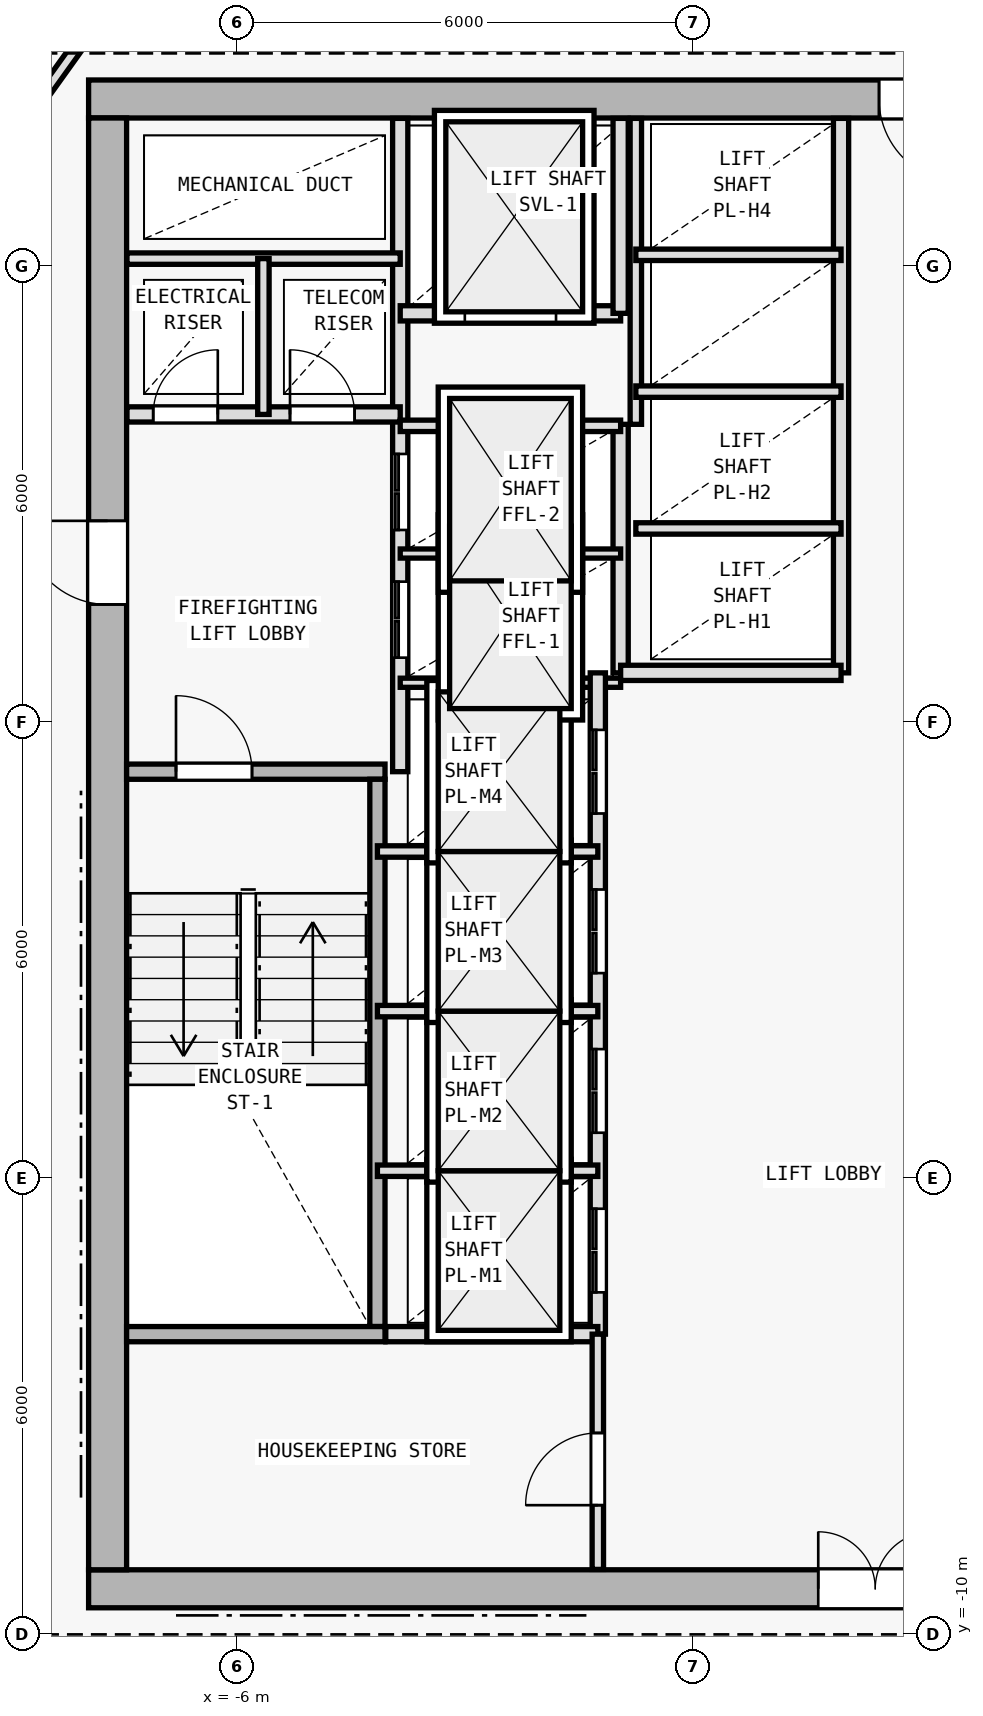
"""IFC4 building model, lengths in metres.
Left out: names, types, materials, properties, quantities, classifications, styles, units other than length and angle.
Written with IfcOpenShell. Run it as: python <this file> out.ifc"""

import sys

from ifc_helpers import new_model, si_unit, direction, frame, frame_2d, origin, origin_2d, place, context, subcontext, project, spatial, rectangle, i_section, extrude, element, fill, save


model = new_model("IFC4")
c1 = context("Model", 3, precision=1e-05, world=origin(), true_north=direction((0.0, 1.0)))
c2 = subcontext(c1, "Body", "Model", "MODEL_VIEW")
j1 = project(units=[si_unit("LENGTHUNIT", "METRE"), si_unit("PLANEANGLEUNIT", "RADIAN")], contexts=[c1])
p1 = place(None, origin())
s1 = spatial("IfcSite", under=j1, at=p1, CompositionType="ELEMENT")
p2 = place(p1, origin())
s2 = spatial("IfcBuilding", under=s1, at=p2, CompositionType="ELEMENT")
p3 = place(p2, frame((0.0, 0.0, 145.8)))
s3 = spatial("IfcBuildingStorey", under=s2, at=p3, CompositionType="ELEMENT", Elevation=145.8)
for number, where, z_axis, x_axis in (
    (1, (-7.7, -9.4, 0.0), (0.0, 0.0, 1.0), (1.0, 0.0, 0.0)),
    (2, (-7.7, 10.2, 0.0), (0.0, 0.0, 1.0), (1.0, 0.0, 0.0)),
    (3, (0.0, -9.4, 0.0), (0.0, 0.0, 1.0), (1.0, 0.0, 0.0)),
    (4, (-7.7, 2.0, 0.0), (0.0, 0.0, 1.0), (1.0, 0.0, 0.0)),
):
    element("IfcColumn", number, at=place(p3, frame(where, z_axis=z_axis, x_axis=x_axis)), inside=s3, PredefinedType="COLUMN", context=c2, shape_type="SweptSolid", body=[
        extrude(i_section(OverallWidth=0.404, OverallDepth=0.407, WebThickness=0.017, FlangeThickness=0.028, FilletRadius=0.015, at=origin_2d()), origin(), (0.0, 0.0, 1.0), 3.6),
    ])
p4 = place(p3, frame((-7.95, -9.4, 0.0), z_axis=(0.0, 0.0, 1.0), x_axis=(1.0, 0.0, 0.0)))
e5 = element("IfcWall", 5, at=p4, inside=s3, PredefinedType="SHEAR", context=c2, shape_type="SweptSolid", body=[
    extrude(rectangle(XDim=15.9, YDim=0.5, at=frame_2d((7.95, 0.0))), origin(), (0.0, 0.0, 1.0), 3.35),
])
p5 = place(p4, frame((9.6, 0.0, 0.0)))
e6 = element("IfcOpeningElement", 6, at=p5, cuts=e5, PredefinedType="OPENING", context=c2, shape_type="SweptSolid", body=[
    extrude(rectangle(XDim=1.5, YDim=2.2, at=frame_2d((0.75, 1.1))), frame((0.0, 0.26, 0.0), z_axis=(0.0, -1.0, 0.0), x_axis=(1.0, 0.0, 0.0)), (0.0, 0.0, 1.0), 0.52),
])
p6 = place(p3, frame((7.95, 10.2, 0.0), z_axis=(0.0, 0.0, 1.0), x_axis=(-1.0, 0.0, 0.0)))
e7 = element("IfcWall", 7, at=p6, inside=s3, PredefinedType="SHEAR", context=c2, shape_type="SweptSolid", body=[
    extrude(rectangle(XDim=15.9, YDim=0.5, at=frame_2d((7.95, 0.0))), origin(), (0.0, 0.0, 1.0), 3.35),
])
p7 = place(p6, frame((4.4, 0.0, 0.0)))
e8 = element("IfcOpeningElement", 8, at=p7, cuts=e7, PredefinedType="OPENING", context=c2, shape_type="SweptSolid", body=[
    extrude(rectangle(XDim=1.1, YDim=2.15, at=frame_2d((0.55, 1.075))), frame((0.0, 0.26, 0.0), z_axis=(0.0, -1.0, 0.0), x_axis=(1.0, 0.0, 0.0)), (0.0, 0.0, 1.0), 0.52),
])
p8 = place(p3, frame((-7.7, -9.15, 0.0), z_axis=(0.0, 0.0, 1.0), x_axis=(0.0, 1.0, 0.0)))
e9 = element("IfcWall", 9, at=p8, inside=s3, PredefinedType="SHEAR", context=c2, shape_type="SweptSolid", body=[
    extrude(rectangle(XDim=19.1, YDim=0.5, at=frame_2d((9.55, 0.0))), origin(), (0.0, 0.0, 1.0), 3.35),
])
p9 = place(p8, frame((12.7, 0.0, 0.0)))
e10 = element("IfcOpeningElement", 10, at=p9, cuts=e9, PredefinedType="OPENING", context=c2, shape_type="SweptSolid", body=[
    extrude(rectangle(XDim=1.1, YDim=2.15, at=frame_2d((0.55, 1.075))), frame((0.0, 0.26, 0.0), z_axis=(0.0, -1.0, 0.0), x_axis=(1.0, 0.0, 0.0)), (0.0, 0.0, 1.0), 0.52),
])
p10 = place(p3, frame((-7.45, 1.35, 0.0), z_axis=(0.0, 0.0, 1.0), x_axis=(1.0, 0.0, 0.0)))
e11 = element("IfcWall", 11, at=p10, inside=s3, PredefinedType="SOLIDWALL", context=c2, shape_type="SweptSolid", body=[
    extrude(rectangle(XDim=3.4, YDim=0.2, at=frame_2d((1.7, 0.0))), origin(), (0.0, 0.0, 1.0), 3.35),
])
p11 = place(p10, frame((0.65, 0.0, 0.0)))
e12 = element("IfcOpeningElement", 12, at=p11, cuts=e11, PredefinedType="OPENING", context=c2, shape_type="SweptSolid", body=[
    extrude(rectangle(XDim=1.0, YDim=2.15, at=frame_2d((0.5, 1.075))), frame((0.0, 0.11, 0.0), z_axis=(0.0, -1.0, 0.0), x_axis=(1.0, 0.0, 0.0)), (0.0, 0.0, 1.0), 0.22),
])
p12 = place(p3, frame((-4.15, -5.95, 0.0), z_axis=(0.0, 0.0, 1.0), x_axis=(0.0, 1.0, 0.0)))
e13 = element("IfcWall", 13, at=p12, inside=s3, PredefinedType="SOLIDWALL", context=c2, shape_type="SweptSolid", body=[
    extrude(rectangle(XDim=7.2, YDim=0.2, at=frame_2d((3.6, 0.0))), origin(), (0.0, 0.0, 1.0), 3.35),
])
p13 = place(p3, frame((-3.85, 1.35, 0.0), z_axis=(0.0, 0.0, 1.0), x_axis=(0.0, 1.0, 0.0)))
e14 = element("IfcWall", 14, at=p13, inside=s3, PredefinedType="SOLIDWALL", context=c2, shape_type="SweptSolid", body=[
    extrude(rectangle(XDim=8.595, YDim=0.2, at=frame_2d((4.297, 0.0))), origin(), (0.0, 0.0, 1.0), 3.35),
])
p14 = place(p13, frame((1.5, 0.0, 0.0)))
e15 = element("IfcOpeningElement", 15, at=p14, cuts=e14, PredefinedType="OPENING", context=c2, shape_type="SweptSolid", body=[
    extrude(rectangle(XDim=1.0, YDim=2.15, at=frame_2d((0.5, 1.075))), frame((0.0, 0.11, 0.0), z_axis=(0.0, -1.0, 0.0), x_axis=(1.0, 0.0, 0.0)), (0.0, 0.0, 1.0), 0.22),
])
p15 = place(p13, frame((3.18, 0.0, 0.0)))
e16 = element("IfcOpeningElement", 16, at=p15, cuts=e14, PredefinedType="OPENING", context=c2, shape_type="SweptSolid", body=[
    extrude(rectangle(XDim=1.0, YDim=2.15, at=frame_2d((0.5, 1.075))), frame((0.0, 0.11, 0.0), z_axis=(0.0, -1.0, 0.0), x_axis=(1.0, 0.0, 0.0)), (0.0, 0.0, 1.0), 0.22),
])
p16 = place(p3, frame((-7.445, 6.05, 0.0), z_axis=(0.0, 0.0, 1.0), x_axis=(1.0, 0.0, 0.0)))
e17 = element("IfcWall", 17, at=p16, inside=s3, PredefinedType="SOLIDWALL", context=c2, shape_type="SweptSolid", body=[
    extrude(rectangle(XDim=3.595, YDim=0.2, at=frame_2d((1.797, 0.0))), origin(), (0.0, 0.0, 1.0), 3.35),
])
p17 = place(p16, frame((0.345, 0.0, 0.0)))
e18 = element("IfcOpeningElement", 18, at=p17, cuts=e17, PredefinedType="OPENING", context=c2, shape_type="SweptSolid", body=[
    extrude(rectangle(XDim=0.85, YDim=2.1, at=frame_2d((0.425, 1.05))), frame((0.0, 0.11, 0.0), z_axis=(0.0, -1.0, 0.0), x_axis=(1.0, 0.0, 0.0)), (0.0, 0.0, 1.0), 0.22),
])
p18 = place(p16, frame((2.145, 0.0, 0.0)))
e19 = element("IfcOpeningElement", 19, at=p18, cuts=e17, PredefinedType="OPENING", context=c2, shape_type="SweptSolid", body=[
    extrude(rectangle(XDim=0.85, YDim=2.1, at=frame_2d((0.425, 1.05))), frame((0.0, 0.11, 0.0), z_axis=(0.0, -1.0, 0.0), x_axis=(1.0, 0.0, 0.0)), (0.0, 0.0, 1.0), 0.22),
])
p19 = place(p3, frame((-7.445, 8.1, 0.0), z_axis=(0.0, 0.0, 1.0), x_axis=(1.0, 0.0, 0.0)))
e20 = element("IfcWall", 20, at=p19, inside=s3, PredefinedType="PARTITIONING", context=c2, shape_type="SweptSolid", body=[
    extrude(rectangle(XDim=3.595, YDim=0.15, at=frame_2d((1.797, 0.0))), origin(), (0.0, 0.0, 1.0), 3.35),
])
p20 = place(p3, frame((-5.65, 6.05, 0.0), z_axis=(0.0, 0.0, 1.0), x_axis=(0.0, 1.0, 0.0)))
e21 = element("IfcWall", 21, at=p20, inside=s3, PredefinedType="PARTITIONING", context=c2, shape_type="SweptSolid", body=[
    extrude(rectangle(XDim=2.05, YDim=0.15, at=frame_2d((1.025, 0.0))), origin(), (0.0, 0.0, 1.0), 3.35),
])
p21 = place(p3, frame((-0.95, 2.65, 0.0), z_axis=(0.0, 0.0, 1.0), x_axis=(0.0, 1.0, 0.0)))
e22 = element("IfcWall", 22, at=p21, inside=s3, PredefinedType="SOLIDWALL", context=c2, shape_type="SweptSolid", body=[
    extrude(rectangle(XDim=3.27, YDim=0.2, at=frame_2d((1.635, 0.0))), origin(), (0.0, 0.0, 1.0), 3.35),
])
for number, where, z_axis, x_axis in (
    (23, (-3.85, 2.52, 0.0), (0.0, 0.0, 1.0), (1.0, 0.0, 0.0)),
    (24, (-3.85, 4.22, 0.0), (0.0, 0.0, 1.0), (1.0, 0.0, 0.0)),
):
    element("IfcWall", number, at=place(p3, frame(where, z_axis=z_axis, x_axis=x_axis)), inside=s3, PredefinedType="PARTITIONING", context=c2, shape_type="SweptSolid", body=[
        extrude(rectangle(XDim=2.9, YDim=0.12, at=frame_2d((1.45, 0.0))), origin(), (0.0, 0.0, 1.0), 3.35),
    ])
p22 = place(p3, frame((-3.85, 5.9, 0.0), z_axis=(0.0, 0.0, 1.0), x_axis=(1.0, 0.0, 0.0)))
e25 = element("IfcWall", 25, at=p22, inside=s3, PredefinedType="PARTITIONING", context=c2, shape_type="SweptSolid", body=[
    extrude(rectangle(XDim=2.9, YDim=0.15, at=frame_2d((1.45, 0.0))), origin(), (0.0, 0.0, 1.0), 3.35),
])
p23 = place(p3, frame((-3.85, 7.38, 0.0), z_axis=(0.0, 0.0, 1.0), x_axis=(1.0, 0.0, 0.0)))
e26 = element("IfcWall", 26, at=p23, inside=s3, PredefinedType="SOLIDWALL", context=c2, shape_type="SweptSolid", body=[
    extrude(rectangle(XDim=2.9, YDim=0.2, at=frame_2d((1.45, 0.0))), origin(), (0.0, 0.0, 1.0), 3.35),
])
p24 = place(p23, frame((0.85, 0.0, 0.0)))
e27 = element("IfcOpeningElement", 27, at=p24, cuts=e26, PredefinedType="OPENING", context=c2, shape_type="SweptSolid", body=[
    extrude(rectangle(XDim=1.2, YDim=2.2, at=frame_2d((0.6, 1.1))), frame((0.0, 0.11, 0.0), z_axis=(0.0, -1.0, 0.0), x_axis=(1.0, 0.0, 0.0)), (0.0, 0.0, 1.0), 0.22),
])
p25 = place(p3, frame((-0.95, 7.38, 0.0), z_axis=(0.0, 0.0, 1.0), x_axis=(0.0, 1.0, 0.0)))
e28 = element("IfcWall", 28, at=p25, inside=s3, PredefinedType="SOLIDWALL", context=c2, shape_type="SweptSolid", body=[
    extrude(rectangle(XDim=2.565, YDim=0.2, at=frame_2d((1.283, 0.0))), origin(), (0.0, 0.0, 1.0), 3.35),
])
p26 = place(p3, frame((-1.25, -6.05, 0.0), z_axis=(0.0, 0.0, 1.0), x_axis=(0.0, 1.0, 0.0)))
e29 = element("IfcWall", 29, at=p26, inside=s3, PredefinedType="SOLIDWALL", context=c2, shape_type="SweptSolid", body=[
    extrude(rectangle(XDim=8.7, YDim=0.2, at=frame_2d((4.35, 0.0))), origin(), (0.0, 0.0, 1.0), 3.35),
])
p27 = place(p26, frame((0.55, 0.0, 0.0)))
e30 = element("IfcOpeningElement", 30, at=p27, cuts=e29, PredefinedType="OPENING", context=c2, shape_type="SweptSolid", body=[
    extrude(rectangle(XDim=1.1, YDim=2.15, at=frame_2d((0.55, 1.075))), frame((0.0, 0.11, 0.0), z_axis=(0.0, -1.0, 0.0), x_axis=(1.0, 0.0, 0.0)), (0.0, 0.0, 1.0), 0.22),
])
p28 = place(p26, frame((2.65, 0.0, 0.0)))
e31 = element("IfcOpeningElement", 31, at=p28, cuts=e29, PredefinedType="OPENING", context=c2, shape_type="SweptSolid", body=[
    extrude(rectangle(XDim=1.1, YDim=2.15, at=frame_2d((0.55, 1.075))), frame((0.0, 0.11, 0.0), z_axis=(0.0, -1.0, 0.0), x_axis=(1.0, 0.0, 0.0)), (0.0, 0.0, 1.0), 0.22),
])
p29 = place(p26, frame((4.75, 0.0, 0.0)))
e32 = element("IfcOpeningElement", 32, at=p29, cuts=e29, PredefinedType="OPENING", context=c2, shape_type="SweptSolid", body=[
    extrude(rectangle(XDim=1.1, YDim=2.15, at=frame_2d((0.55, 1.075))), frame((0.0, 0.11, 0.0), z_axis=(0.0, -1.0, 0.0), x_axis=(1.0, 0.0, 0.0)), (0.0, 0.0, 1.0), 0.22),
])
p30 = place(p26, frame((6.85, 0.0, 0.0)))
e33 = element("IfcOpeningElement", 33, at=p30, cuts=e29, PredefinedType="OPENING", context=c2, shape_type="SweptSolid", body=[
    extrude(rectangle(XDim=1.1, YDim=2.15, at=frame_2d((0.55, 1.075))), frame((0.0, 0.11, 0.0), z_axis=(0.0, -1.0, 0.0), x_axis=(1.0, 0.0, 0.0)), (0.0, 0.0, 1.0), 0.22),
])
for number, where, z_axis, x_axis in (
    (34, (-4.15, -3.9, 0.0), (0.0, 0.0, 1.0), (1.0, 0.0, 0.0)),
    (35, (-4.15, -1.8, 0.0), (0.0, 0.0, 1.0), (1.0, 0.0, 0.0)),
    (36, (-4.15, 0.3, 0.0), (0.0, 0.0, 1.0), (1.0, 0.0, 0.0)),
):
    element("IfcWall", number, at=place(p3, frame(where, z_axis=z_axis, x_axis=x_axis)), inside=s3, PredefinedType="PARTITIONING", context=c2, shape_type="SweptSolid", body=[
        extrude(rectangle(XDim=2.9, YDim=0.15, at=frame_2d((1.45, 0.0))), origin(), (0.0, 0.0, 1.0), 3.35),
    ])
p31 = place(p3, frame((1.95, 2.65, 0.0), z_axis=(0.0, 0.0, 1.0), x_axis=(0.0, 1.0, 0.0)))
e37 = element("IfcWall", 37, at=p31, inside=s3, PredefinedType="SOLIDWALL", context=c2, shape_type="SweptSolid", body=[
    extrude(rectangle(XDim=7.295, YDim=0.2, at=frame_2d((3.647, 0.0))), origin(), (0.0, 0.0, 1.0), 3.35),
])
p32 = place(p3, frame((-0.95, 2.65, 0.0), z_axis=(0.0, 0.0, 1.0), x_axis=(1.0, 0.0, 0.0)))
e38 = element("IfcWall", 38, at=p32, inside=s3, PredefinedType="SOLIDWALL", context=c2, shape_type="SweptSolid", body=[
    extrude(rectangle(XDim=2.9, YDim=0.2, at=frame_2d((1.45, 0.0))), origin(), (0.0, 0.0, 1.0), 3.35),
])
p33 = place(p3, frame((-0.75, 5.92, 0.0), z_axis=(0.0, 0.0, 1.0), x_axis=(0.0, 1.0, 0.0)))
e39 = element("IfcWall", 39, at=p33, inside=s3, PredefinedType="PARTITIONING", context=c2, shape_type="SweptSolid", body=[
    extrude(rectangle(XDim=4.025, YDim=0.15, at=frame_2d((2.013, 0.0))), origin(), (0.0, 0.0, 1.0), 3.35),
])
for number, where, z_axis, x_axis in (
    (40, (-0.75, 4.55, 0.0), (0.0, 0.0, 1.0), (1.0, 0.0, 0.0)),
    (41, (-0.75, 6.35, 0.0), (0.0, 0.0, 1.0), (1.0, 0.0, 0.0)),
    (42, (-0.75, 8.15, 0.0), (0.0, 0.0, 1.0), (1.0, 0.0, 0.0)),
):
    element("IfcWall", number, at=place(p3, frame(where, z_axis=z_axis, x_axis=x_axis)), inside=s3, PredefinedType="PARTITIONING", context=c2, shape_type="SweptSolid", body=[
        extrude(rectangle(XDim=2.7, YDim=0.15, at=frame_2d((1.35, 0.0))), origin(), (0.0, 0.0, 1.0), 3.35),
    ])
p34 = place(p3, frame((-7.45, -6.05, 0.0), z_axis=(0.0, 0.0, 1.0), x_axis=(1.0, 0.0, 0.0)))
e43 = element("IfcWall", 43, at=p34, inside=s3, PredefinedType="SOLIDWALL", context=c2, shape_type="SweptSolid", body=[
    extrude(rectangle(XDim=3.4, YDim=0.2, at=frame_2d((1.7, 0.0))), origin(), (0.0, 0.0, 1.0), 3.35),
])
p35 = place(p3, frame((-4.04, -6.05, 0.0), z_axis=(0.0, 0.0, 1.0), x_axis=(1.0, 0.0, 0.0)))
e44 = element("IfcWall", 44, at=p35, inside=s3, PredefinedType="SOLIDWALL", context=c2, shape_type="SweptSolid", body=[
    extrude(rectangle(XDim=2.79, YDim=0.2, at=frame_2d((1.395, 0.0))), origin(), (0.0, 0.0, 1.0), 3.35),
])
p36 = place(p3, frame((-1.25, -9.145, 0.0), z_axis=(0.0, 0.0, 1.0), x_axis=(0.0, 1.0, 0.0)))
e45 = element("IfcWall", 45, at=p36, inside=s3, PredefinedType="PARTITIONING", context=c2, shape_type="SweptSolid", body=[
    extrude(rectangle(XDim=3.095, YDim=0.15, at=frame_2d((1.547, 0.0))), origin(), (0.0, 0.0, 1.0), 3.35),
])
p37 = place(p36, frame((0.845, 0.0, 0.0)))
e46 = element("IfcOpeningElement", 46, at=p37, cuts=e45, PredefinedType="OPENING", context=c2, shape_type="SweptSolid", body=[
    extrude(rectangle(XDim=0.95, YDim=2.1, at=frame_2d((0.475, 1.05))), frame((0.0, 0.085, 0.0), z_axis=(0.0, -1.0, 0.0), x_axis=(1.0, 0.0, 0.0)), (0.0, 0.0, 1.0), 0.17),
])
p38 = place(p3, frame((-9.86, 8.426, 0.0), z_axis=(0.0, 0.0, 1.0), x_axis=(0.582449511476, 0.812866881218, 0.0)))
e47 = element("IfcWall", 47, at=p38, inside=s3, PredefinedType="PARTITIONING", context=c2, shape_type="SweptSolid", body=[
    extrude(rectangle(XDim=4.84, YDim=0.15, at=frame_2d((2.42, 0.0))), origin(), (0.0, 0.0, 1.0), 2.965),
])
p39 = place(p5, origin())
e48 = element("IfcDoor", 48, at=p39, inside=s3, OperationType="DOUBLE_DOOR_SINGLE_SWING", PredefinedType="DOOR", context=c2, shape_type="SweptSolid", body=[
    extrude(rectangle(XDim=1.5, YDim=2.2, at=frame_2d((0.75, 1.1))), frame((0.0, 0.025, 0.0), z_axis=(0.0, -1.0, 0.0), x_axis=(1.0, 0.0, 0.0)), (0.0, 0.0, 1.0), 0.05),
])
fill(e6, e48)
p40 = place(p9, origin())
e49 = element("IfcDoor", 49, at=p40, inside=s3, OperationType="SINGLE_SWING_RIGHT", PredefinedType="DOOR", context=c2, shape_type="SweptSolid", body=[
    extrude(rectangle(XDim=1.1, YDim=2.15, at=frame_2d((0.55, 1.075))), frame((0.0, 0.025, 0.0), z_axis=(0.0, -1.0, 0.0), x_axis=(1.0, 0.0, 0.0)), (0.0, 0.0, 1.0), 0.05),
])
fill(e10, e49)
p41 = place(p7, origin())
e50 = element("IfcDoor", 50, at=p41, inside=s3, OperationType="SINGLE_SWING_LEFT", PredefinedType="DOOR", context=c2, shape_type="SweptSolid", body=[
    extrude(rectangle(XDim=1.1, YDim=2.15, at=frame_2d((0.55, 1.075))), frame((0.0, 0.025, 0.0), z_axis=(0.0, -1.0, 0.0), x_axis=(1.0, 0.0, 0.0)), (0.0, 0.0, 1.0), 0.05),
])
fill(e8, e50)
p42 = place(p11, origin())
e51 = element("IfcDoor", 51, at=p42, inside=s3, OperationType="SINGLE_SWING_LEFT", PredefinedType="DOOR", context=c2, shape_type="SweptSolid", body=[
    extrude(rectangle(XDim=1.0, YDim=2.15, at=frame_2d((0.5, 1.075))), frame((0.0, 0.025, 0.0), z_axis=(0.0, -1.0, 0.0), x_axis=(1.0, 0.0, 0.0)), (0.0, 0.0, 1.0), 0.05),
])
fill(e12, e51)
p43 = place(p17, origin())
e52 = element("IfcDoor", 52, at=p43, inside=s3, OperationType="SINGLE_SWING_RIGHT", PredefinedType="DOOR", context=c2, shape_type="SweptSolid", body=[
    extrude(rectangle(XDim=0.85, YDim=2.1, at=frame_2d((0.425, 1.05))), frame((0.0, 0.025, 0.0), z_axis=(0.0, -1.0, 0.0), x_axis=(1.0, 0.0, 0.0)), (0.0, 0.0, 1.0), 0.05),
])
fill(e18, e52)
p44 = place(p18, origin())
e53 = element("IfcDoor", 53, at=p44, inside=s3, OperationType="SINGLE_SWING_LEFT", PredefinedType="DOOR", context=c2, shape_type="SweptSolid", body=[
    extrude(rectangle(XDim=0.85, YDim=2.1, at=frame_2d((0.425, 1.05))), frame((0.0, 0.025, 0.0), z_axis=(0.0, -1.0, 0.0), x_axis=(1.0, 0.0, 0.0)), (0.0, 0.0, 1.0), 0.05),
])
fill(e19, e53)
p45 = place(p24, origin())
e54 = element("IfcDoor", 54, at=p45, inside=s3, OperationType="DOUBLE_DOOR_SLIDING", PredefinedType="DOOR", context=c2, shape_type="SweptSolid", body=[
    extrude(rectangle(XDim=1.2, YDim=2.2, at=frame_2d((0.6, 1.1))), frame((0.0, 0.025, 0.0), z_axis=(0.0, -1.0, 0.0), x_axis=(1.0, 0.0, 0.0)), (0.0, 0.0, 1.0), 0.05),
])
fill(e27, e54)
p46 = place(p27, origin())
e55 = element("IfcDoor", 55, at=p46, inside=s3, OperationType="DOUBLE_DOOR_SLIDING", PredefinedType="DOOR", context=c2, shape_type="SweptSolid", body=[
    extrude(rectangle(XDim=1.1, YDim=2.15, at=frame_2d((0.55, 1.075))), frame((0.0, 0.025, 0.0), z_axis=(0.0, -1.0, 0.0), x_axis=(1.0, 0.0, 0.0)), (0.0, 0.0, 1.0), 0.05),
])
fill(e30, e55)
p47 = place(p28, origin())
e56 = element("IfcDoor", 56, at=p47, inside=s3, OperationType="DOUBLE_DOOR_SLIDING", PredefinedType="DOOR", context=c2, shape_type="SweptSolid", body=[
    extrude(rectangle(XDim=1.1, YDim=2.15, at=frame_2d((0.55, 1.075))), frame((0.0, 0.025, 0.0), z_axis=(0.0, -1.0, 0.0), x_axis=(1.0, 0.0, 0.0)), (0.0, 0.0, 1.0), 0.05),
])
fill(e31, e56)
p48 = place(p29, origin())
e57 = element("IfcDoor", 57, at=p48, inside=s3, OperationType="DOUBLE_DOOR_SLIDING", PredefinedType="DOOR", context=c2, shape_type="SweptSolid", body=[
    extrude(rectangle(XDim=1.1, YDim=2.15, at=frame_2d((0.55, 1.075))), frame((0.0, 0.025, 0.0), z_axis=(0.0, -1.0, 0.0), x_axis=(1.0, 0.0, 0.0)), (0.0, 0.0, 1.0), 0.05),
])
fill(e32, e57)
p49 = place(p30, origin())
e58 = element("IfcDoor", 58, at=p49, inside=s3, OperationType="DOUBLE_DOOR_SLIDING", PredefinedType="DOOR", context=c2, shape_type="SweptSolid", body=[
    extrude(rectangle(XDim=1.1, YDim=2.15, at=frame_2d((0.55, 1.075))), frame((0.0, 0.025, 0.0), z_axis=(0.0, -1.0, 0.0), x_axis=(1.0, 0.0, 0.0)), (0.0, 0.0, 1.0), 0.05),
])
fill(e33, e58)
p50 = place(p14, origin())
e59 = element("IfcDoor", 59, at=p50, inside=s3, OperationType="DOUBLE_DOOR_SLIDING", PredefinedType="DOOR", context=c2, shape_type="SweptSolid", body=[
    extrude(rectangle(XDim=1.0, YDim=2.15, at=frame_2d((0.5, 1.075))), frame((0.0, 0.025, 0.0), z_axis=(0.0, -1.0, 0.0), x_axis=(1.0, 0.0, 0.0)), (0.0, 0.0, 1.0), 0.05),
])
fill(e15, e59)
p51 = place(p15, origin())
e60 = element("IfcDoor", 60, at=p51, inside=s3, OperationType="DOUBLE_DOOR_SLIDING", PredefinedType="DOOR", context=c2, shape_type="SweptSolid", body=[
    extrude(rectangle(XDim=1.0, YDim=2.15, at=frame_2d((0.5, 1.075))), frame((0.0, 0.025, 0.0), z_axis=(0.0, -1.0, 0.0), x_axis=(1.0, 0.0, 0.0)), (0.0, 0.0, 1.0), 0.05),
])
fill(e16, e60)
p52 = place(p37, origin())
e61 = element("IfcDoor", 61, at=p52, inside=s3, OperationType="SINGLE_SWING_LEFT", PredefinedType="DOOR", context=c2, shape_type="SweptSolid", body=[
    extrude(rectangle(XDim=0.95, YDim=2.1, at=frame_2d((0.475, 1.05))), frame((0.0, 0.025, 0.0), z_axis=(0.0, -1.0, 0.0), x_axis=(1.0, 0.0, 0.0)), (0.0, 0.0, 1.0), 0.05),
])
fill(e46, e61)
save(model, sys.argv[1])
